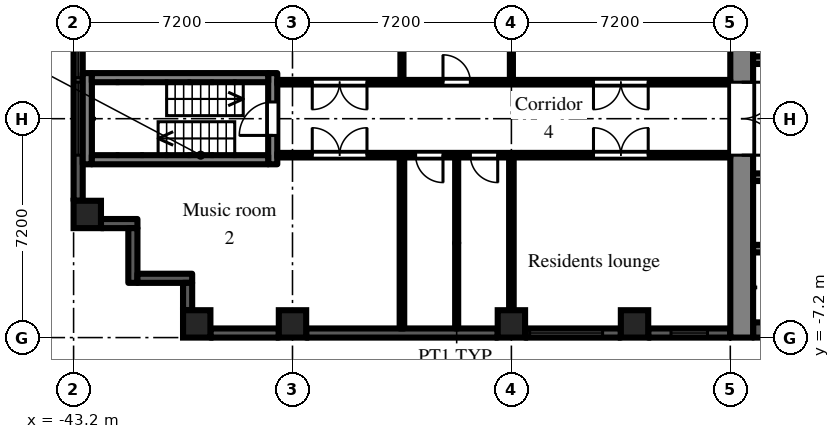
"""IFC4 building model, lengths in metres.
Left out: names, types, materials, properties, quantities, classifications, styles, units other than length and angle.
Written with IfcOpenShell. Run it as: python <this file> out.ifc"""

import sys

from ifc_helpers import new_model, si_unit, direction, frame, frame_2d, origin, origin_2d, place, context, subcontext, project, spatial, rectangle, extrude, element, fill, save


model = new_model("IFC4")
c1 = context("Model", 3, precision=1e-05, world=origin(), true_north=direction((0.0, 1.0)))
c2 = subcontext(c1, "Body", "Model", "MODEL_VIEW")
j1 = project(units=[si_unit("LENGTHUNIT", "METRE"), si_unit("PLANEANGLEUNIT", "RADIAN")], contexts=[c1])
p1 = place(None, origin())
s1 = spatial("IfcSite", under=j1, at=p1, CompositionType="ELEMENT")
p2 = place(p1, origin())
s2 = spatial("IfcBuilding", under=s1, at=p2, CompositionType="ELEMENT")
p3 = place(p2, frame((0.0, 0.0, 11.7)))
s3 = spatial("IfcBuildingStorey", under=s2, at=p3, CompositionType="ELEMENT", Elevation=11.7)
for number, where, z_axis, x_axis in (
    (1, (-42.75, -3.15, 0.0), (0.0, 0.0, 1.0), (1.0, 0.0, 0.0)),
    (2, (-39.15, -6.75, 0.0), (0.0, 0.0, 1.0), (1.0, 0.0, 0.0)),
    (3, (-36.0, -6.75, 0.0), (0.0, 0.0, 1.0), (1.0, 0.0, 0.0)),
    (4, (-28.8, -6.75, 0.0), (0.0, 0.0, 1.0), (1.0, 0.0, 0.0)),
    (5, (-24.75, -6.75, 0.0), (0.0, 0.0, 1.0), (1.0, 0.0, 0.0)),
):
    element("IfcColumn", number, at=place(p3, frame(where, z_axis=z_axis, x_axis=x_axis)), inside=s3, PredefinedType="COLUMN", context=c2, shape_type="SweptSolid", body=[
        extrude(rectangle(XDim=0.9, YDim=0.9, at=origin_2d()), origin(), (0.0, 0.0, 1.0), 3.0),
    ])
p4 = place(p3, frame((-43.05, 2.7, 0.0), z_axis=(0.0, 0.0, 1.0), x_axis=(0.0, -1.0, 0.0)))
e6 = element("IfcWall", 6, at=p4, inside=s3, PredefinedType="SOLIDWALL", context=c2, shape_type="SweptSolid", body=[
    extrude(rectangle(XDim=5.4, YDim=0.3, at=frame_2d((2.7, 0.0))), origin(), (0.0, 0.0, 1.0), 2.1),
])
p5 = place(p4, frame((1.5, 0.0, 0.2)))
e7 = element("IfcOpeningElement", 7, at=p5, cuts=e6, PredefinedType="OPENING", context=c2, shape_type="SweptSolid", body=[
    extrude(rectangle(XDim=2.4, YDim=1.85, at=frame_2d((1.2, 0.925))), frame((0.0, 0.16, 0.0), z_axis=(0.0, -1.0, 0.0), x_axis=(1.0, 0.0, 0.0)), (0.0, 0.0, 1.0), 0.32),
])
p6 = place(p4, frame((0.15, 0.0, 0.2)))
e8 = element("IfcOpeningElement", 8, at=p6, cuts=e6, PredefinedType="OPENING", context=c2, shape_type="SweptSolid", body=[
    extrude(rectangle(XDim=1.2, YDim=1.85, at=frame_2d((0.6, 0.925))), frame((0.0, 0.16, 0.0), z_axis=(0.0, -1.0, 0.0), x_axis=(1.0, 0.0, 0.0)), (0.0, 0.0, 1.0), 0.32),
])
p7 = place(p3, frame((-42.3, -3.45, 0.0), z_axis=(0.0, 0.0, 1.0), x_axis=(1.0, 0.0, 0.0)))
e9 = element("IfcWall", 9, at=p7, inside=s3, PredefinedType="SOLIDWALL", context=c2, shape_type="SweptSolid", body=[
    extrude(rectangle(XDim=1.2, YDim=0.3, at=frame_2d((0.6, 0.0))), origin(), (0.0, 0.0, 1.0), 2.575),
])
p8 = place(p3, frame((-41.25, -3.6, 0.0), z_axis=(0.0, 0.0, 1.0), x_axis=(0.0, -1.0, 0.0)))
e10 = element("IfcWall", 10, at=p8, inside=s3, PredefinedType="SOLIDWALL", context=c2, shape_type="SweptSolid", body=[
    extrude(rectangle(XDim=1.8, YDim=0.3, at=frame_2d((0.9, 0.0))), origin(), (0.0, 0.0, 1.0), 2.575),
])
p9 = place(p3, frame((-41.1, -5.25, 0.0), z_axis=(0.0, 0.0, 1.0), x_axis=(1.0, 0.0, 0.0)))
e11 = element("IfcWall", 11, at=p9, inside=s3, PredefinedType="SOLIDWALL", context=c2, shape_type="SweptSolid", body=[
    extrude(rectangle(XDim=1.8, YDim=0.3, at=frame_2d((0.9, 0.0))), origin(), (0.0, 0.0, 1.0), 2.575),
])
p10 = place(p3, frame((-39.45, -5.4, 0.0), z_axis=(0.0, 0.0, 1.0), x_axis=(0.0, -1.0, 0.0)))
e12 = element("IfcWall", 12, at=p10, inside=s3, PredefinedType="SOLIDWALL", context=c2, shape_type="SweptSolid", body=[
    extrude(rectangle(XDim=0.9, YDim=0.3, at=frame_2d((0.45, 0.0))), origin(), (0.0, 0.0, 1.0), 2.575),
])
p11 = place(p3, frame((-38.7, -7.05, 0.0), z_axis=(0.0, 0.0, 1.0), x_axis=(1.0, 0.0, 0.0)))
e13 = element("IfcWall", 13, at=p11, inside=s3, PredefinedType="SOLIDWALL", context=c2, shape_type="SweptSolid", body=[
    extrude(rectangle(XDim=2.25, YDim=0.3, at=frame_2d((1.125, 0.0))), origin(), (0.0, 0.0, 1.0), 2.1),
])
p12 = place(p3, frame((-35.55, -7.05, 0.0), z_axis=(0.0, 0.0, 1.0), x_axis=(1.0, 0.0, 0.0)))
e14 = element("IfcWall", 14, at=p12, inside=s3, PredefinedType="SOLIDWALL", context=c2, shape_type="SweptSolid", body=[
    extrude(rectangle(XDim=6.3, YDim=0.3, at=frame_2d((3.15, 0.0))), origin(), (0.0, 0.0, 1.0), 2.1),
])
p13 = place(p3, frame((-28.35, -7.05, 0.0), z_axis=(0.0, 0.0, 1.0), x_axis=(1.0, 0.0, 0.0)))
e15 = element("IfcWall", 15, at=p13, inside=s3, PredefinedType="SOLIDWALL", context=c2, shape_type="SweptSolid", body=[
    extrude(rectangle(XDim=3.15, YDim=0.3, at=frame_2d((1.575, 0.0))), origin(), (0.0, 0.0, 1.0), 2.1),
])
p14 = place(p13, frame((0.15, 0.0, 0.2)))
e16 = element("IfcOpeningElement", 16, at=p14, cuts=e15, PredefinedType="OPENING", context=c2, shape_type="SweptSolid", body=[
    extrude(rectangle(XDim=2.4, YDim=1.85, at=frame_2d((1.2, 0.925))), frame((0.0, 0.16, 0.0), z_axis=(0.0, -1.0, 0.0), x_axis=(1.0, 0.0, 0.0)), (0.0, 0.0, 1.0), 0.32),
])
p15 = place(p3, frame((-24.3, -7.05, 0.0), z_axis=(0.0, 0.0, 1.0), x_axis=(1.0, 0.0, 0.0)))
e17 = element("IfcWall", 17, at=p15, inside=s3, PredefinedType="SOLIDWALL", context=c2, shape_type="SweptSolid", body=[
    extrude(rectangle(XDim=2.7, YDim=0.3, at=frame_2d((1.35, 0.0))), origin(), (0.0, 0.0, 1.0), 2.1),
])
p16 = place(p15, frame((0.75, 0.0, 0.2)))
e18 = element("IfcOpeningElement", 18, at=p16, cuts=e17, PredefinedType="OPENING", context=c2, shape_type="SweptSolid", body=[
    extrude(rectangle(XDim=1.2, YDim=1.85, at=frame_2d((0.6, 0.925))), frame((0.0, 0.16, 0.0), z_axis=(0.0, -1.0, 0.0), x_axis=(1.0, 0.0, 0.0)), (0.0, 0.0, 1.0), 0.32),
])
p17 = place(p3, frame((-21.225, -7.2, 0.0), z_axis=(0.0, 0.0, 1.0), x_axis=(0.0, 1.0, 0.0)))
e19 = element("IfcWall", 19, at=p17, inside=s3, PredefinedType="SHEAR", context=c2, shape_type="SweptSolid", body=[
    extrude(rectangle(XDim=14.4, YDim=0.75, at=frame_2d((7.2, 0.0))), origin(), (0.0, 0.0, 1.0), 2.575),
])
p18 = place(p17, frame((6.0, 0.0, 0.0)))
e20 = element("IfcOpeningElement", 20, at=p18, cuts=e19, PredefinedType="OPENING", context=c2, shape_type="SweptSolid", body=[
    extrude(rectangle(XDim=2.4, YDim=2.2, at=frame_2d((1.2, 1.1))), frame((0.0, 0.385, 0.0), z_axis=(0.0, -1.0, 0.0), x_axis=(1.0, 0.0, 0.0)), (0.0, 0.0, 1.0), 0.77),
])
p19 = place(p3, frame((-7.9, 1.925, 0.0), z_axis=(0.0, 0.0, 1.0), x_axis=(-1.0, 0.0, 0.0)))
e21 = element("IfcWall", 21, at=p19, inside=s3, PredefinedType="SHEAR", context=c2, shape_type="SweptSolid", body=[
    extrude(rectangle(XDim=12.95, YDim=0.25, at=frame_2d((6.475, 0.0))), origin(), (0.0, 0.0, 1.0), 2.575),
])
p20 = place(p19, frame((0.525, 0.0, 0.0)))
e22 = element("IfcOpeningElement", 22, at=p20, cuts=e21, PredefinedType="OPENING", context=c2, shape_type="SweptSolid", body=[
    extrude(rectangle(XDim=0.9, YDim=2.1, at=frame_2d((0.45, 1.05))), frame((0.0, 0.135, 0.0), z_axis=(0.0, -1.0, 0.0), x_axis=(1.0, 0.0, 0.0)), (0.0, 0.0, 1.0), 0.27),
])
p21 = place(p19, frame((2.625, 0.0, 0.0)))
e23 = element("IfcOpeningElement", 23, at=p21, cuts=e21, PredefinedType="OPENING", context=c2, shape_type="SweptSolid", body=[
    extrude(rectangle(XDim=1.1, YDim=2.1, at=frame_2d((0.55, 1.05))), frame((0.0, 0.135, 0.0), z_axis=(0.0, -1.0, 0.0), x_axis=(1.0, 0.0, 0.0)), (0.0, 0.0, 1.0), 0.27),
])
p22 = place(p19, frame((7.125, 0.0, 0.0)))
e24 = element("IfcOpeningElement", 24, at=p22, cuts=e21, PredefinedType="OPENING", context=c2, shape_type="SweptSolid", body=[
    extrude(rectangle(XDim=0.9, YDim=2.1, at=frame_2d((0.45, 1.05))), frame((0.0, 0.135, 0.0), z_axis=(0.0, -1.0, 0.0), x_axis=(1.0, 0.0, 0.0)), (0.0, 0.0, 1.0), 0.27),
])
p23 = place(p3, frame((-7.9, -6.95, 0.0), z_axis=(0.0, 0.0, 1.0), x_axis=(-1.0, 0.0, 0.0)))
e25 = element("IfcWall", 25, at=p23, inside=s3, PredefinedType="SHEAR", context=c2, shape_type="SweptSolid", body=[
    extrude(rectangle(XDim=12.95, YDim=0.5, at=frame_2d((6.475, 0.0))), origin(), (0.0, 0.0, 1.0), 2.575),
])
p24 = place(p3, frame((-7.9, -1.925, 0.0), z_axis=(0.0, 0.0, 1.0), x_axis=(-1.0, 0.0, 0.0)))
e26 = element("IfcWall", 26, at=p24, inside=s3, PredefinedType="SHEAR", context=c2, shape_type="SweptSolid", body=[
    extrude(rectangle(XDim=12.95, YDim=0.25, at=frame_2d((6.475, 0.0))), origin(), (0.0, 0.0, 1.0), 2.575),
])
p25 = place(p24, frame((4.825, 0.0, 0.0)))
e27 = element("IfcOpeningElement", 27, at=p25, cuts=e26, PredefinedType="OPENING", context=c2, shape_type="SweptSolid", body=[
    extrude(rectangle(XDim=1.1, YDim=2.1, at=frame_2d((0.55, 1.05))), frame((0.0, 0.135, 0.0), z_axis=(0.0, -1.0, 0.0), x_axis=(1.0, 0.0, 0.0)), (0.0, 0.0, 1.0), 0.27),
])
p26 = place(p24, frame((7.025, 0.0, 0.0)))
e28 = element("IfcOpeningElement", 28, at=p26, cuts=e26, PredefinedType="OPENING", context=c2, shape_type="SweptSolid", body=[
    extrude(rectangle(XDim=1.1, YDim=2.1, at=frame_2d((0.55, 1.05))), frame((0.0, 0.135, 0.0), z_axis=(0.0, -1.0, 0.0), x_axis=(1.0, 0.0, 0.0)), (0.0, 0.0, 1.0), 0.27),
])
p27 = place(p24, frame((9.225, 0.0, 0.0)))
e29 = element("IfcOpeningElement", 29, at=p27, cuts=e26, PredefinedType="OPENING", context=c2, shape_type="SweptSolid", body=[
    extrude(rectangle(XDim=1.1, YDim=2.1, at=frame_2d((0.55, 1.05))), frame((0.0, 0.135, 0.0), z_axis=(0.0, -1.0, 0.0), x_axis=(1.0, 0.0, 0.0)), (0.0, 0.0, 1.0), 0.27),
])
p28 = place(p24, frame((0.525, 0.0, 0.0)))
e30 = element("IfcOpeningElement", 30, at=p28, cuts=e26, PredefinedType="OPENING", context=c2, shape_type="SweptSolid", body=[
    extrude(rectangle(XDim=0.9, YDim=2.1, at=frame_2d((0.45, 1.05))), frame((0.0, 0.135, 0.0), z_axis=(0.0, -1.0, 0.0), x_axis=(1.0, 0.0, 0.0)), (0.0, 0.0, 1.0), 0.27),
])
p29 = place(p24, frame((2.625, 0.0, 0.0)))
e31 = element("IfcOpeningElement", 31, at=p29, cuts=e26, PredefinedType="OPENING", context=c2, shape_type="SweptSolid", body=[
    extrude(rectangle(XDim=1.1, YDim=2.1, at=frame_2d((0.55, 1.05))), frame((0.0, 0.135, 0.0), z_axis=(0.0, -1.0, 0.0), x_axis=(1.0, 0.0, 0.0)), (0.0, 0.0, 1.0), 0.27),
])
p30 = place(p3, frame((-12.3, -4.275, 0.0), z_axis=(0.0, 0.0, 1.0), x_axis=(-1.0, 0.0, 0.0)))
e32 = element("IfcWall", 32, at=p30, inside=s3, PredefinedType="SHEAR", context=c2, shape_type="SweptSolid", body=[
    extrude(rectangle(XDim=8.55, YDim=0.25, at=frame_2d((4.275, 0.0))), origin(), (0.0, 0.0, 1.0), 2.575),
])
p31 = place(p3, frame((-36.65, -1.5, 0.0), z_axis=(0.0, 0.0, 1.0), x_axis=(0.0, 1.0, 0.0)))
e33 = element("IfcWall", 33, at=p31, inside=s3, PredefinedType="SHEAR", context=c2, shape_type="SweptSolid", body=[
    extrude(rectangle(XDim=3.0, YDim=0.3, at=frame_2d((1.5, 0.0))), origin(), (0.0, 0.0, 1.0), 2.575),
])
p32 = place(p31, frame((0.95, 0.0, 0.0)))
e34 = element("IfcOpeningElement", 34, at=p32, cuts=e33, PredefinedType="OPENING", context=c2, shape_type="SweptSolid", body=[
    extrude(rectangle(XDim=1.1, YDim=2.1, at=frame_2d((0.55, 1.05))), frame((0.0, 0.16, 0.0), z_axis=(0.0, -1.0, 0.0), x_axis=(1.0, 0.0, 0.0)), (0.0, 0.0, 1.0), 0.32),
])
p33 = place(p3, frame((-42.75, -1.5, 0.0), z_axis=(0.0, 0.0, 1.0), x_axis=(0.0, 1.0, 0.0)))
e35 = element("IfcWall", 35, at=p33, inside=s3, PredefinedType="SHEAR", context=c2, shape_type="SweptSolid", body=[
    extrude(rectangle(XDim=3.0, YDim=0.3, at=frame_2d((1.5, 0.0))), origin(), (0.0, 0.0, 1.0), 2.575),
])
for number, where, z_axis, x_axis in (
    (36, (-36.8, -1.35, 0.0), (0.0, 0.0, 1.0), (-1.0, 0.0, 0.0)),
    (37, (-36.8, 1.35, 0.0), (0.0, 0.0, 1.0), (-1.0, 0.0, 0.0)),
):
    element("IfcWall", number, at=place(p3, frame(where, z_axis=z_axis, x_axis=x_axis)), inside=s3, PredefinedType="SHEAR", context=c2, shape_type="SweptSolid", body=[
        extrude(rectangle(XDim=5.8, YDim=0.3, at=frame_2d((2.9, 0.0))), origin(), (0.0, 0.0, 1.0), 2.575),
    ])
p34 = place(p3, frame((-36.5, -1.2, 0.0), z_axis=(0.0, 0.0, 1.0), x_axis=(1.0, 0.0, 0.0)))
e38 = element("IfcWall", 38, at=p34, inside=s3, PredefinedType="PARTITIONING", context=c2, shape_type="SweptSolid", body=[
    extrude(rectangle(XDim=14.9, YDim=0.15, at=frame_2d((7.45, 0.0))), origin(), (0.0, 0.0, 1.0), 2.575),
])
p35 = place(p34, frame((10.4, 0.0, 0.0)))
e39 = element("IfcOpeningElement", 39, at=p35, cuts=e38, PredefinedType="OPENING", context=c2, shape_type="SweptSolid", body=[
    extrude(rectangle(XDim=1.8, YDim=2.1, at=frame_2d((0.9, 1.05))), frame((0.0, 0.085, 0.0), z_axis=(0.0, -1.0, 0.0), x_axis=(1.0, 0.0, 0.0)), (0.0, 0.0, 1.0), 0.17),
])
p36 = place(p34, frame((6.35, 0.0, 0.0)))
e40 = element("IfcOpeningElement", 40, at=p36, cuts=e38, PredefinedType="OPENING", context=c2, shape_type="SweptSolid", body=[
    extrude(rectangle(XDim=0.9, YDim=2.1, at=frame_2d((0.45, 1.05))), frame((0.0, 0.085, 0.0), z_axis=(0.0, -1.0, 0.0), x_axis=(1.0, 0.0, 0.0)), (0.0, 0.0, 1.0), 0.17),
])
p37 = place(p34, frame((4.55, 0.0, 0.0)))
e41 = element("IfcOpeningElement", 41, at=p37, cuts=e38, PredefinedType="OPENING", context=c2, shape_type="SweptSolid", body=[
    extrude(rectangle(XDim=0.9, YDim=2.1, at=frame_2d((0.45, 1.05))), frame((0.0, 0.085, 0.0), z_axis=(0.0, -1.0, 0.0), x_axis=(1.0, 0.0, 0.0)), (0.0, 0.0, 1.0), 0.17),
])
p38 = place(p34, frame((1.15, 0.0, 0.0)))
e42 = element("IfcOpeningElement", 42, at=p38, cuts=e38, PredefinedType="OPENING", context=c2, shape_type="SweptSolid", body=[
    extrude(rectangle(XDim=1.8, YDim=2.1, at=frame_2d((0.9, 1.05))), frame((0.0, 0.085, 0.0), z_axis=(0.0, -1.0, 0.0), x_axis=(1.0, 0.0, 0.0)), (0.0, 0.0, 1.0), 0.17),
])
p39 = place(p3, frame((-36.5, 1.2, 0.0), z_axis=(0.0, 0.0, 1.0), x_axis=(1.0, 0.0, 0.0)))
e43 = element("IfcWall", 43, at=p39, inside=s3, PredefinedType="PARTITIONING", context=c2, shape_type="SweptSolid", body=[
    extrude(rectangle(XDim=14.9, YDim=0.15, at=frame_2d((7.45, 0.0))), origin(), (0.0, 0.0, 1.0), 2.575),
])
p40 = place(p39, frame((10.4, 0.0, 0.0)))
e44 = element("IfcOpeningElement", 44, at=p40, cuts=e43, PredefinedType="OPENING", context=c2, shape_type="SweptSolid", body=[
    extrude(rectangle(XDim=1.8, YDim=2.1, at=frame_2d((0.9, 1.05))), frame((0.0, 0.085, 0.0), z_axis=(0.0, -1.0, 0.0), x_axis=(1.0, 0.0, 0.0)), (0.0, 0.0, 1.0), 0.17),
])
p41 = place(p39, frame((5.45, 0.0, 0.0)))
e45 = element("IfcOpeningElement", 45, at=p41, cuts=e43, PredefinedType="OPENING", context=c2, shape_type="SweptSolid", body=[
    extrude(rectangle(XDim=0.9, YDim=2.1, at=frame_2d((0.45, 1.05))), frame((0.0, 0.085, 0.0), z_axis=(0.0, -1.0, 0.0), x_axis=(1.0, 0.0, 0.0)), (0.0, 0.0, 1.0), 0.17),
])
p42 = place(p39, frame((1.15, 0.0, 0.0)))
e46 = element("IfcOpeningElement", 46, at=p42, cuts=e43, PredefinedType="OPENING", context=c2, shape_type="SweptSolid", body=[
    extrude(rectangle(XDim=1.8, YDim=2.1, at=frame_2d((0.9, 1.05))), frame((0.0, 0.085, 0.0), z_axis=(0.0, -1.0, 0.0), x_axis=(1.0, 0.0, 0.0)), (0.0, 0.0, 1.0), 0.17),
])
p43 = place(p3, frame((-32.4, -6.9, 0.0), z_axis=(0.0, 0.0, 1.0), x_axis=(0.0, 1.0, 0.0)))
e47 = element("IfcWall", 47, at=p43, inside=s3, PredefinedType="PARTITIONING", context=c2, shape_type="SweptSolid", body=[
    extrude(rectangle(XDim=5.625, YDim=0.15, at=frame_2d((2.812, 0.0))), origin(), (0.0, 0.0, 1.0), 2.575),
])
for number, where, z_axis, x_axis in (
    (48, (-32.4, 1.275, 0.0), (0.0, 0.0, 1.0), (0.0, 1.0, 0.0)),
    (49, (-30.6, -6.9, 0.0), (0.0, 0.0, 1.0), (0.0, 1.0, 0.0)),
):
    element("IfcWall", number, at=place(p3, frame(where, z_axis=z_axis, x_axis=x_axis)), inside=s3, PredefinedType="PARTITIONING", context=c2, shape_type="SweptSolid", body=[
        extrude(rectangle(XDim=5.625, YDim=0.1, at=frame_2d((2.812, 0.0))), origin(), (0.0, 0.0, 1.0), 2.575),
    ])
p44 = place(p3, frame((-28.8, -6.9, 0.0), z_axis=(0.0, 0.0, 1.0), x_axis=(0.0, 1.0, 0.0)))
e50 = element("IfcWall", 50, at=p44, inside=s3, PredefinedType="PARTITIONING", context=c2, shape_type="SweptSolid", body=[
    extrude(rectangle(XDim=5.625, YDim=0.15, at=frame_2d((2.812, 0.0))), origin(), (0.0, 0.0, 1.0), 2.575),
])
p45 = place(p3, frame((-28.8, 1.275, 0.0), z_axis=(0.0, 0.0, 1.0), x_axis=(0.0, 1.0, 0.0)))
e51 = element("IfcWall", 51, at=p45, inside=s3, PredefinedType="PARTITIONING", context=c2, shape_type="SweptSolid", body=[
    extrude(rectangle(XDim=5.625, YDim=0.1, at=frame_2d((2.812, 0.0))), origin(), (0.0, 0.0, 1.0), 2.575),
])
p46 = place(p5, origin())
e52 = element("IfcWindow", 52, at=p46, inside=s3, PartitioningType="SINGLE_PANEL", PredefinedType="WINDOW", context=c2, shape_type="SweptSolid", body=[
    extrude(rectangle(XDim=2.4, YDim=1.85, at=frame_2d((1.2, 0.925))), frame((0.0, 0.03, 0.0), z_axis=(0.0, -1.0, 0.0), x_axis=(1.0, 0.0, 0.0)), (0.0, 0.0, 1.0), 0.06),
])
fill(e7, e52)
p47 = place(p6, origin())
e53 = element("IfcWindow", 53, at=p47, inside=s3, PartitioningType="SINGLE_PANEL", PredefinedType="WINDOW", context=c2, shape_type="SweptSolid", body=[
    extrude(rectangle(XDim=1.2, YDim=1.85, at=frame_2d((0.6, 0.925))), frame((0.0, 0.03, 0.0), z_axis=(0.0, -1.0, 0.0), x_axis=(1.0, 0.0, 0.0)), (0.0, 0.0, 1.0), 0.06),
])
fill(e8, e53)
p48 = place(p14, origin())
e54 = element("IfcWindow", 54, at=p48, inside=s3, PartitioningType="SINGLE_PANEL", PredefinedType="WINDOW", context=c2, shape_type="SweptSolid", body=[
    extrude(rectangle(XDim=2.4, YDim=1.85, at=frame_2d((1.2, 0.925))), frame((0.0, 0.03, 0.0), z_axis=(0.0, -1.0, 0.0), x_axis=(1.0, 0.0, 0.0)), (0.0, 0.0, 1.0), 0.06),
])
fill(e16, e54)
p49 = place(p16, origin())
e55 = element("IfcWindow", 55, at=p49, inside=s3, PartitioningType="SINGLE_PANEL", PredefinedType="WINDOW", context=c2, shape_type="SweptSolid", body=[
    extrude(rectangle(XDim=1.2, YDim=1.85, at=frame_2d((0.6, 0.925))), frame((0.0, 0.03, 0.0), z_axis=(0.0, -1.0, 0.0), x_axis=(1.0, 0.0, 0.0)), (0.0, 0.0, 1.0), 0.06),
])
fill(e18, e55)
p50 = place(p18, frame((2.4, 0.0, 0.0), z_axis=(0.0, 0.0, 1.0), x_axis=(-1.0, 0.0, 0.0)))
e56 = element("IfcDoor", 56, at=p50, inside=s3, OperationType="DOUBLE_DOOR_DOUBLE_SWING", PredefinedType="DOOR", context=c2, shape_type="SweptSolid", body=[
    extrude(rectangle(XDim=2.4, YDim=2.2, at=frame_2d((1.2, 1.1))), frame((0.0, 0.025, 0.0), z_axis=(0.0, -1.0, 0.0), x_axis=(1.0, 0.0, 0.0)), (0.0, 0.0, 1.0), 0.05),
])
fill(e20, e56)
p51 = place(p32, origin())
e57 = element("IfcDoor", 57, at=p51, inside=s3, OperationType="SINGLE_SWING_LEFT", PredefinedType="DOOR", context=c2, shape_type="SweptSolid", body=[
    extrude(rectangle(XDim=1.1, YDim=2.1, at=frame_2d((0.55, 1.05))), frame((0.0, 0.025, 0.0), z_axis=(0.0, -1.0, 0.0), x_axis=(1.0, 0.0, 0.0)), (0.0, 0.0, 1.0), 0.05),
])
fill(e34, e57)
p52 = place(p35, origin())
e58 = element("IfcDoor", 58, at=p52, inside=s3, OperationType="DOUBLE_DOOR_DOUBLE_SWING", PredefinedType="DOOR", context=c2, shape_type="SweptSolid", body=[
    extrude(rectangle(XDim=1.8, YDim=2.1, at=frame_2d((0.9, 1.05))), frame((0.0, 0.025, 0.0), z_axis=(0.0, -1.0, 0.0), x_axis=(1.0, 0.0, 0.0)), (0.0, 0.0, 1.0), 0.05),
])
fill(e39, e58)
p53 = place(p36, frame((0.9, 0.0, 0.0), z_axis=(0.0, 0.0, 1.0), x_axis=(-1.0, 0.0, 0.0)))
e59 = element("IfcDoor", 59, at=p53, inside=s3, OperationType="SINGLE_SWING_LEFT", PredefinedType="DOOR", context=c2, shape_type="SweptSolid", body=[
    extrude(rectangle(XDim=0.9, YDim=2.1, at=frame_2d((0.45, 1.05))), frame((0.0, 0.025, 0.0), z_axis=(0.0, -1.0, 0.0), x_axis=(1.0, 0.0, 0.0)), (0.0, 0.0, 1.0), 0.05),
])
fill(e40, e59)
p54 = place(p37, frame((0.9, 0.0, 0.0), z_axis=(0.0, 0.0, 1.0), x_axis=(-1.0, 0.0, 0.0)))
e60 = element("IfcDoor", 60, at=p54, inside=s3, OperationType="SINGLE_SWING_LEFT", PredefinedType="DOOR", context=c2, shape_type="SweptSolid", body=[
    extrude(rectangle(XDim=0.9, YDim=2.1, at=frame_2d((0.45, 1.05))), frame((0.0, 0.025, 0.0), z_axis=(0.0, -1.0, 0.0), x_axis=(1.0, 0.0, 0.0)), (0.0, 0.0, 1.0), 0.05),
])
fill(e41, e60)
p55 = place(p38, origin())
e61 = element("IfcDoor", 61, at=p55, inside=s3, OperationType="DOUBLE_DOOR_DOUBLE_SWING", PredefinedType="DOOR", context=c2, shape_type="SweptSolid", body=[
    extrude(rectangle(XDim=1.8, YDim=2.1, at=frame_2d((0.9, 1.05))), frame((0.0, 0.025, 0.0), z_axis=(0.0, -1.0, 0.0), x_axis=(1.0, 0.0, 0.0)), (0.0, 0.0, 1.0), 0.05),
])
fill(e42, e61)
p56 = place(p40, frame((1.8, 0.0, 0.0), z_axis=(0.0, 0.0, 1.0), x_axis=(-1.0, 0.0, 0.0)))
e62 = element("IfcDoor", 62, at=p56, inside=s3, OperationType="DOUBLE_DOOR_DOUBLE_SWING", PredefinedType="DOOR", context=c2, shape_type="SweptSolid", body=[
    extrude(rectangle(XDim=1.8, YDim=2.1, at=frame_2d((0.9, 1.05))), frame((0.0, 0.025, 0.0), z_axis=(0.0, -1.0, 0.0), x_axis=(1.0, 0.0, 0.0)), (0.0, 0.0, 1.0), 0.05),
])
fill(e44, e62)
p57 = place(p41, origin())
e63 = element("IfcDoor", 63, at=p57, inside=s3, OperationType="SINGLE_SWING_LEFT", PredefinedType="DOOR", context=c2, shape_type="SweptSolid", body=[
    extrude(rectangle(XDim=0.9, YDim=2.1, at=frame_2d((0.45, 1.05))), frame((0.0, 0.025, 0.0), z_axis=(0.0, -1.0, 0.0), x_axis=(1.0, 0.0, 0.0)), (0.0, 0.0, 1.0), 0.05),
])
fill(e45, e63)
p58 = place(p42, frame((1.8, 0.0, 0.0), z_axis=(0.0, 0.0, 1.0), x_axis=(-1.0, 0.0, 0.0)))
e64 = element("IfcDoor", 64, at=p58, inside=s3, OperationType="DOUBLE_DOOR_DOUBLE_SWING", PredefinedType="DOOR", context=c2, shape_type="SweptSolid", body=[
    extrude(rectangle(XDim=1.8, YDim=2.1, at=frame_2d((0.9, 1.05))), frame((0.0, 0.025, 0.0), z_axis=(0.0, -1.0, 0.0), x_axis=(1.0, 0.0, 0.0)), (0.0, 0.0, 1.0), 0.05),
])
fill(e46, e64)
save(model, sys.argv[1])
